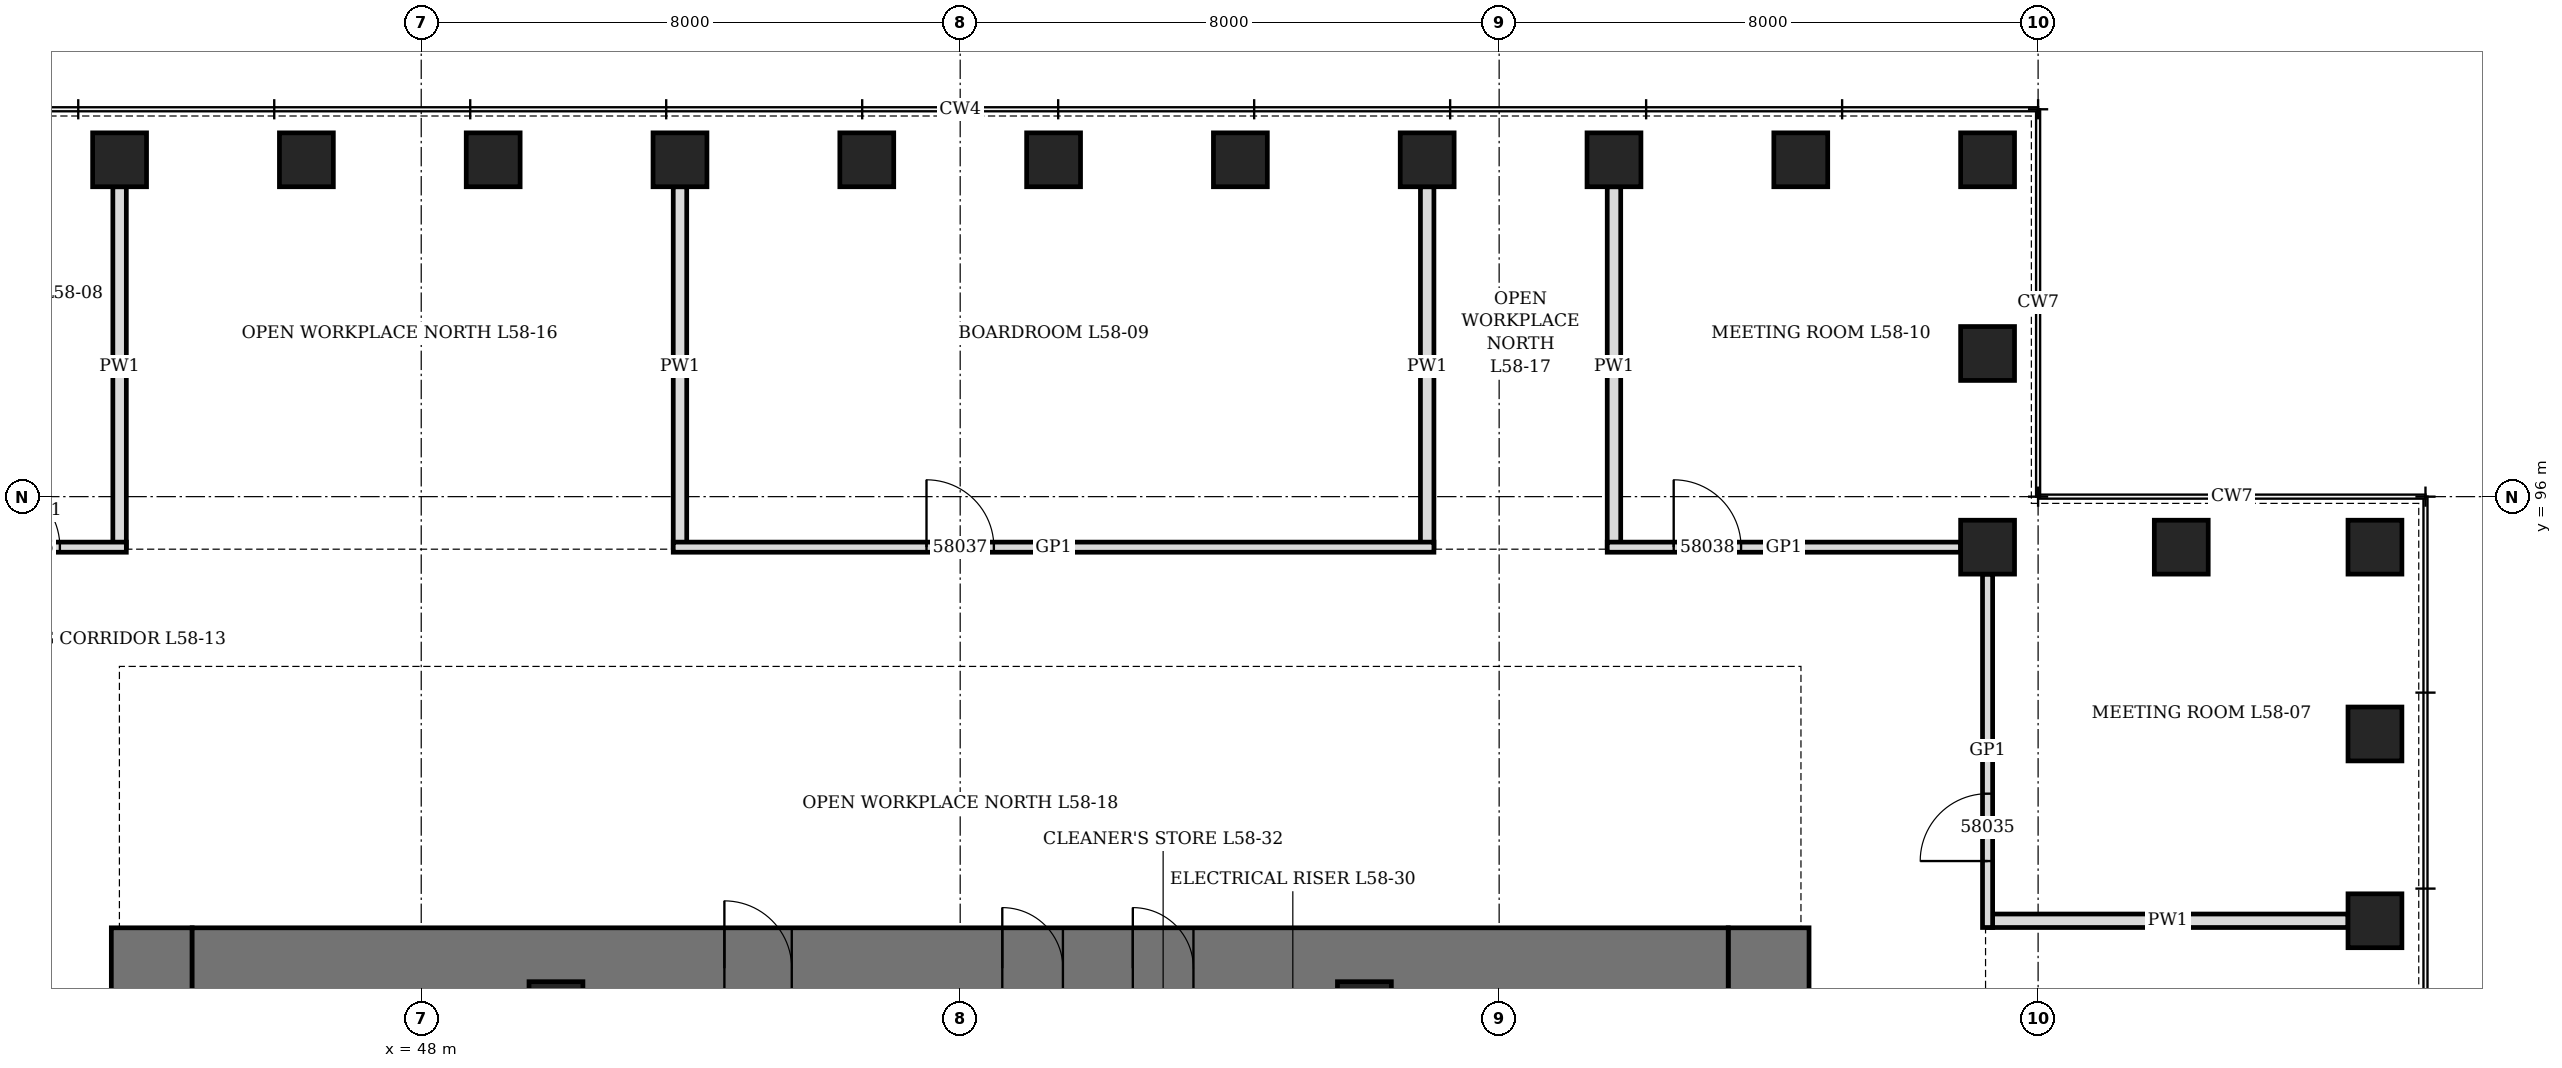
"""IFC4 building model, lengths in metres.
Left out: names, types, materials, properties, quantities, classifications, styles, units other than length and angle.
Written with IfcOpenShell. Run it as: python <this file> out.ifc"""

import sys

from ifc_helpers import new_model, si_unit, direction, frame, frame_2d, origin, origin_2d, place, context, subcontext, project, spatial, rectangle, hollow_rectangle, extrude, element, fill, save


model = new_model("IFC4")
c1 = context("Model", 3, precision=1e-05, world=origin(), true_north=direction((0.0, 1.0)))
c2 = subcontext(c1, "Body", "Model", "MODEL_VIEW")
j1 = project(units=[si_unit("LENGTHUNIT", "METRE"), si_unit("PLANEANGLEUNIT", "RADIAN")], contexts=[c1])
p1 = place(None, origin())
s1 = spatial("IfcSite", under=j1, at=p1, CompositionType="ELEMENT")
p2 = place(p1, origin())
s2 = spatial("IfcBuilding", under=s1, at=p2, CompositionType="ELEMENT")
p3 = place(p2, frame((0.0, 0.0, 258.7)))
s3 = spatial("IfcBuildingStorey", under=s2, at=p3, CompositionType="ELEMENT", Elevation=258.7)
for number, where, z_axis, x_axis in (
    (1, (77.0, 89.705, 0.0), (0.0, 0.0, 1.0), (0.0, 1.0, 0.0)),
    (2, (77.0, 92.477, 0.0), (0.0, 0.0, 1.0), (0.0, 1.0, 0.0)),
    (3, (77.0, 95.25, 0.0), (0.0, 0.0, 1.0), (1.0, 0.0, 0.0)),
    (4, (74.125, 95.25, 0.0), (0.0, 0.0, 1.0), (1.0, 0.0, 0.0)),
    (5, (71.25, 95.25, 0.0), (0.0, 0.0, 1.0), (0.0, 1.0, 0.0)),
    (6, (71.25, 98.125, 0.0), (0.0, 0.0, 1.0), (0.0, 1.0, 0.0)),
    (7, (71.25, 101.0, 0.0), (0.0, 0.0, 1.0), (1.0, 0.0, 0.0)),
    (8, (68.477, 101.0, 0.0), (0.0, 0.0, 1.0), (1.0, 0.0, 0.0)),
    (9, (65.705, 101.0, 0.0), (0.0, 0.0, 1.0), (1.0, 0.0, 0.0)),
    (10, (62.932, 101.0, 0.0), (0.0, 0.0, 1.0), (1.0, 0.0, 0.0)),
    (11, (60.159, 101.0, 0.0), (0.0, 0.0, 1.0), (1.0, 0.0, 0.0)),
    (12, (57.386, 101.0, 0.0), (0.0, 0.0, 1.0), (1.0, 0.0, 0.0)),
    (13, (54.614, 101.0, 0.0), (0.0, 0.0, 1.0), (1.0, 0.0, 0.0)),
    (14, (51.841, 101.0, 0.0), (0.0, 0.0, 1.0), (1.0, 0.0, 0.0)),
    (15, (49.068, 101.0, 0.0), (0.0, 0.0, 1.0), (1.0, 0.0, 0.0)),
    (16, (46.295, 101.0, 0.0), (0.0, 0.0, 1.0), (1.0, 0.0, 0.0)),
    (17, (43.523, 101.0, 0.0), (0.0, 0.0, 1.0), (1.0, 0.0, 0.0)),
):
    element("IfcColumn", number, at=place(p3, frame(where, z_axis=z_axis, x_axis=x_axis)), inside=s3, PredefinedType="COLUMN", context=c2, shape_type="SweptSolid", body=[
        extrude(hollow_rectangle(XDim=0.8, YDim=0.8, WallThickness=0.1, at=origin_2d()), origin(), (0.0, 0.0, 1.0), 4.2),
    ])
p4 = place(p3, frame((44.0, 70.4, 0.0), z_axis=(0.0, 0.0, 1.0), x_axis=(0.0, 1.0, 0.0)))
e18 = element("IfcWall", 18, at=p4, inside=s3, PredefinedType="SHEAR", context=c2, shape_type="SweptSolid", body=[
    extrude(rectangle(XDim=19.2, YDim=1.2, at=frame_2d((9.6, 0.0))), origin(), (0.0, 0.0, 1.0), 4.2),
])
p5 = place(p4, frame((8.6, 0.0, 0.0)))
e19 = element("IfcOpeningElement", 19, at=p5, cuts=e18, PredefinedType="OPENING", context=c2, shape_type="SweptSolid", body=[
    extrude(rectangle(XDim=2.0, YDim=2.4, at=frame_2d((1.0, 1.2))), frame((0.0, 0.61, 0.0), z_axis=(0.0, -1.0, 0.0), x_axis=(1.0, 0.0, 0.0)), (0.0, 0.0, 1.0), 1.22),
])
p6 = place(p3, frame((68.0, 70.4, 0.0), z_axis=(0.0, 0.0, 1.0), x_axis=(0.0, 1.0, 0.0)))
e20 = element("IfcWall", 20, at=p6, inside=s3, PredefinedType="SHEAR", context=c2, shape_type="SweptSolid", body=[
    extrude(rectangle(XDim=19.2, YDim=1.2, at=frame_2d((9.6, 0.0))), origin(), (0.0, 0.0, 1.0), 4.2),
])
p7 = place(p6, frame((8.6, 0.0, 0.0)))
e21 = element("IfcOpeningElement", 21, at=p7, cuts=e20, PredefinedType="OPENING", context=c2, shape_type="SweptSolid", body=[
    extrude(rectangle(XDim=2.0, YDim=2.4, at=frame_2d((1.0, 1.2))), frame((0.0, 0.61, 0.0), z_axis=(0.0, -1.0, 0.0), x_axis=(1.0, 0.0, 0.0)), (0.0, 0.0, 1.0), 1.22),
])
p8 = place(p3, frame((44.6, 89.0, 0.0), z_axis=(0.0, 0.0, 1.0), x_axis=(1.0, 0.0, 0.0)))
e22 = element("IfcWall", 22, at=p8, inside=s3, PredefinedType="SHEAR", context=c2, shape_type="SweptSolid", body=[
    extrude(rectangle(XDim=22.8, YDim=1.2, at=frame_2d((11.4, 0.0))), origin(), (0.0, 0.0, 1.0), 4.2),
])
p9 = place(p8, frame((7.9, 0.0, 0.0)))
e23 = element("IfcOpeningElement", 23, at=p9, cuts=e22, PredefinedType="OPENING", context=c2, shape_type="SweptSolid", body=[
    extrude(rectangle(XDim=1.0, YDim=2.1, at=frame_2d((0.5, 1.05))), frame((0.0, 0.61, 0.0), z_axis=(0.0, -1.0, 0.0), x_axis=(1.0, 0.0, 0.0)), (0.0, 0.0, 1.0), 1.22),
])
p10 = place(p8, frame((12.025, 0.0, 0.0)))
e24 = element("IfcOpeningElement", 24, at=p10, cuts=e22, PredefinedType="OPENING", context=c2, shape_type="SweptSolid", body=[
    extrude(rectangle(XDim=0.9, YDim=2.1, at=frame_2d((0.45, 1.05))), frame((0.0, 0.61, 0.0), z_axis=(0.0, -1.0, 0.0), x_axis=(1.0, 0.0, 0.0)), (0.0, 0.0, 1.0), 1.22),
])
p11 = place(p8, frame((13.962, 0.0, 0.0)))
e25 = element("IfcOpeningElement", 25, at=p11, cuts=e22, PredefinedType="OPENING", context=c2, shape_type="SweptSolid", body=[
    extrude(rectangle(XDim=0.9, YDim=2.1, at=frame_2d((0.45, 1.05))), frame((0.0, 0.61, 0.0), z_axis=(0.0, -1.0, 0.0), x_axis=(1.0, 0.0, 0.0)), (0.0, 0.0, 1.0), 1.22),
])
for number, where, z_axis, x_axis in (
    (26, (50.0, 88.4, 0.0), (0.0, 0.0, 1.0), (1.0, 0.0, 0.0)),
    (27, (62.0, 88.4, 0.0), (0.0, 0.0, 1.0), (1.0, 0.0, 0.0)),
):
    element("IfcColumn", number, at=place(p3, frame(where, z_axis=z_axis, x_axis=x_axis)), inside=s3, PredefinedType="COLUMN", context=c2, shape_type="SweptSolid", body=[
        extrude(hollow_rectangle(XDim=0.8, YDim=0.8, WallThickness=0.1, at=origin_2d()), origin(), (0.0, 0.0, 1.0), 4.2),
    ])
for number, where, z_axis, x_axis in (
    (28, (71.25, 89.705, 0.0), (0.0, 0.0, 1.0), (1.0, 0.0, 0.0)),
    (29, (43.523, 95.25, 0.0), (0.0, 0.0, 1.0), (0.0, 1.0, 0.0)),
    (30, (51.841, 95.25, 0.0), (0.0, 0.0, 1.0), (0.0, 1.0, 0.0)),
    (31, (62.932, 95.25, 0.0), (0.0, 0.0, 1.0), (0.0, 1.0, 0.0)),
    (32, (65.705, 95.25, 0.0), (0.0, 0.0, 1.0), (0.0, 1.0, 0.0)),
):
    element("IfcWall", number, at=place(p3, frame(where, z_axis=z_axis, x_axis=x_axis)), inside=s3, PredefinedType="PARTITIONING", context=c2, shape_type="SweptSolid", body=[
        extrude(rectangle(XDim=5.35, YDim=0.2, at=frame_2d((2.675, 0.0))), origin(), (0.0, 0.0, 1.0), 3.428),
    ])
p12 = place(p3, frame((41.15, 95.25, 0.0), z_axis=(0.0, 0.0, 1.0), x_axis=(1.0, 0.0, 0.0)))
e33 = element("IfcWall", 33, at=p12, inside=s3, PredefinedType="PARTITIONING", context=c2, shape_type="SweptSolid", body=[
    extrude(rectangle(XDim=2.473, YDim=0.15, at=frame_2d((1.236, 0.0))), origin(), (0.0, 0.0, 1.0), 4.04),
])
p13 = place(p12, frame((0.486, 0.0, 0.0)))
e34 = element("IfcOpeningElement", 34, at=p13, cuts=e33, PredefinedType="OPENING", context=c2, shape_type="SweptSolid", body=[
    extrude(rectangle(XDim=1.0, YDim=2.4, at=frame_2d((0.5, 1.2))), frame((0.0, 0.085, 0.0), z_axis=(0.0, -1.0, 0.0), x_axis=(1.0, 0.0, 0.0)), (0.0, 0.0, 1.0), 0.17),
])
p14 = place(p3, frame((51.741, 95.25, 0.0), z_axis=(0.0, 0.0, 1.0), x_axis=(1.0, 0.0, 0.0)))
e35 = element("IfcWall", 35, at=p14, inside=s3, PredefinedType="PARTITIONING", context=c2, shape_type="SweptSolid", body=[
    extrude(rectangle(XDim=11.291, YDim=0.15, at=frame_2d((5.646, 0.0))), origin(), (0.0, 0.0, 1.0), 4.04),
])
p15 = place(p14, frame((3.759, 0.0, 0.0)))
e36 = element("IfcOpeningElement", 36, at=p15, cuts=e35, PredefinedType="OPENING", context=c2, shape_type="SweptSolid", body=[
    extrude(rectangle(XDim=1.0, YDim=2.4, at=frame_2d((0.5, 1.2))), frame((0.0, 0.085, 0.0), z_axis=(0.0, -1.0, 0.0), x_axis=(1.0, 0.0, 0.0)), (0.0, 0.0, 1.0), 0.17),
])
p16 = place(p3, frame((65.604, 95.25, 0.0), z_axis=(0.0, 0.0, 1.0), x_axis=(1.0, 0.0, 0.0)))
e37 = element("IfcWall", 37, at=p16, inside=s3, PredefinedType="PARTITIONING", context=c2, shape_type="SweptSolid", body=[
    extrude(rectangle(XDim=5.246, YDim=0.15, at=frame_2d((2.623, 0.0))), origin(), (0.0, 0.0, 1.0), 4.04),
])
p17 = place(p16, frame((0.986, 0.0, 0.0)))
e38 = element("IfcOpeningElement", 38, at=p17, cuts=e37, PredefinedType="OPENING", context=c2, shape_type="SweptSolid", body=[
    extrude(rectangle(XDim=1.0, YDim=2.4, at=frame_2d((0.5, 1.2))), frame((0.0, 0.085, 0.0), z_axis=(0.0, -1.0, 0.0), x_axis=(1.0, 0.0, 0.0)), (0.0, 0.0, 1.0), 0.17),
])
p18 = place(p3, frame((71.25, 89.604, 0.0), z_axis=(0.0, 0.0, 1.0), x_axis=(0.0, 1.0, 0.0)))
e39 = element("IfcWall", 39, at=p18, inside=s3, PredefinedType="PARTITIONING", context=c2, shape_type="SweptSolid", body=[
    extrude(rectangle(XDim=5.246, YDim=0.15, at=frame_2d((2.623, 0.0))), origin(), (0.0, 0.0, 1.0), 4.04),
])
p19 = place(p18, frame((0.986, 0.0, 0.0)))
e40 = element("IfcOpeningElement", 40, at=p19, cuts=e39, PredefinedType="OPENING", context=c2, shape_type="SweptSolid", body=[
    extrude(rectangle(XDim=1.0, YDim=2.4, at=frame_2d((0.5, 1.2))), frame((0.0, 0.085, 0.0), z_axis=(0.0, -1.0, 0.0), x_axis=(1.0, 0.0, 0.0)), (0.0, 0.0, 1.0), 0.17),
])
p20 = place(p9, origin())
e41 = element("IfcDoor", 41, at=p20, inside=s3, OperationType="SINGLE_SWING_LEFT", PredefinedType="DOOR", context=c2, shape_type="SweptSolid", body=[
    extrude(rectangle(XDim=1.0, YDim=2.1, at=frame_2d((0.5, 1.05))), frame((0.0, 0.35, 0.0), z_axis=(0.0, -1.0, 0.0), x_axis=(1.0, 0.0, 0.0)), (0.0, 0.0, 1.0), 0.7),
])
fill(e23, e41)
p21 = place(p10, origin())
e42 = element("IfcDoor", 42, at=p21, inside=s3, OperationType="SINGLE_SWING_LEFT", PredefinedType="DOOR", context=c2, shape_type="SweptSolid", body=[
    extrude(rectangle(XDim=0.9, YDim=2.1, at=frame_2d((0.45, 1.05))), frame((0.0, 0.35, 0.0), z_axis=(0.0, -1.0, 0.0), x_axis=(1.0, 0.0, 0.0)), (0.0, 0.0, 1.0), 0.7),
])
fill(e24, e42)
p22 = place(p11, origin())
e43 = element("IfcDoor", 43, at=p22, inside=s3, OperationType="SINGLE_SWING_LEFT", PredefinedType="DOOR", context=c2, shape_type="SweptSolid", body=[
    extrude(rectangle(XDim=0.9, YDim=2.1, at=frame_2d((0.45, 1.05))), frame((0.0, 0.35, 0.0), z_axis=(0.0, -1.0, 0.0), x_axis=(1.0, 0.0, 0.0)), (0.0, 0.0, 1.0), 0.7),
])
fill(e25, e43)
p23 = place(p19, origin())
e44 = element("IfcDoor", 44, at=p23, inside=s3, OperationType="SINGLE_SWING_RIGHT", PredefinedType="DOOR", context=c2, shape_type="SweptSolid", body=[
    extrude(rectangle(XDim=1.0, YDim=2.4, at=frame_2d((0.5, 1.2))), frame((0.0, 0.075, 0.0), z_axis=(0.0, -1.0, 0.0), x_axis=(1.0, 0.0, 0.0)), (0.0, 0.0, 1.0), 0.149),
])
fill(e40, e44)
p24 = place(p13, origin())
e45 = element("IfcDoor", 45, at=p24, inside=s3, OperationType="SINGLE_SWING_RIGHT", PredefinedType="DOOR", context=c2, shape_type="SweptSolid", body=[
    extrude(rectangle(XDim=1.0, YDim=2.4, at=frame_2d((0.5, 1.2))), frame((0.0, 0.075, 0.0), z_axis=(0.0, -1.0, 0.0), x_axis=(1.0, 0.0, 0.0)), (0.0, 0.0, 1.0), 0.149),
])
fill(e34, e45)
p25 = place(p15, origin())
e46 = element("IfcDoor", 46, at=p25, inside=s3, OperationType="SINGLE_SWING_RIGHT", PredefinedType="DOOR", context=c2, shape_type="SweptSolid", body=[
    extrude(rectangle(XDim=1.0, YDim=2.4, at=frame_2d((0.5, 1.2))), frame((0.0, 0.075, 0.0), z_axis=(0.0, -1.0, 0.0), x_axis=(1.0, 0.0, 0.0)), (0.0, 0.0, 1.0), 0.149),
])
fill(e36, e46)
p26 = place(p17, origin())
e47 = element("IfcDoor", 47, at=p26, inside=s3, OperationType="SINGLE_SWING_RIGHT", PredefinedType="DOOR", context=c2, shape_type="SweptSolid", body=[
    extrude(rectangle(XDim=1.0, YDim=2.4, at=frame_2d((0.5, 1.2))), frame((0.0, 0.075, 0.0), z_axis=(0.0, -1.0, 0.0), x_axis=(1.0, 0.0, 0.0)), (0.0, 0.0, 1.0), 0.149),
])
fill(e38, e47)
save(model, sys.argv[1])
